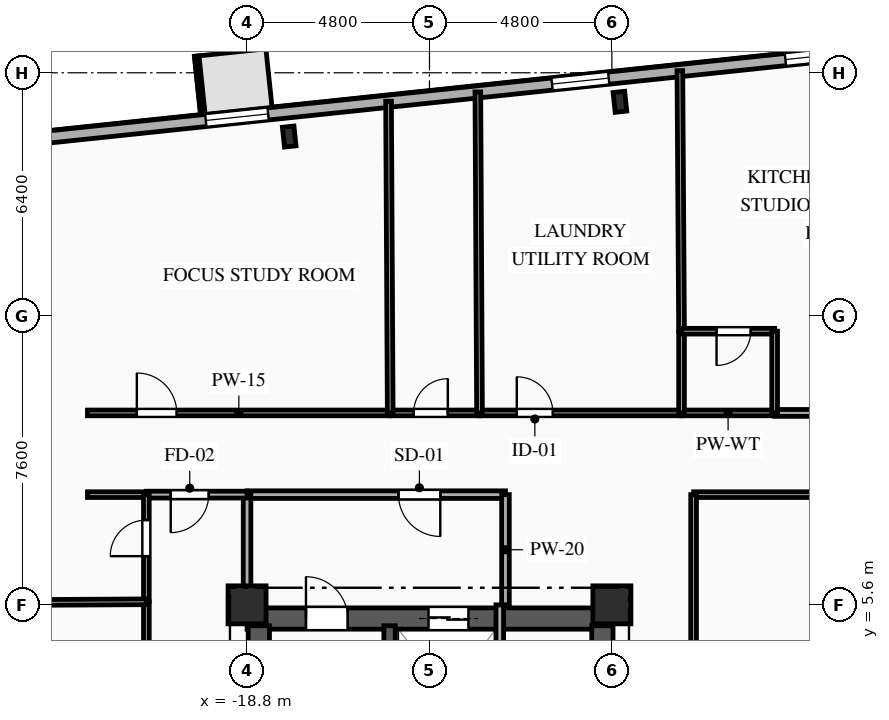
"""IFC4 building model, lengths in metres.
Left out: names, types, materials, properties, quantities, classifications, styles, units other than length and angle.
Written with IfcOpenShell. Run it as: python <this file> out.ifc"""

import sys

from ifc_helpers import new_model, si_unit, direction, frame, frame_2d, origin, origin_2d, place, context, subcontext, project, spatial, rectangle, i_section, extrude, element, fill, save


model = new_model("IFC4")
c1 = context("Model", 3, precision=1e-05, world=origin(), true_north=direction((0.0, 1.0)))
c2 = subcontext(c1, "Body", "Model", "MODEL_VIEW")
j1 = project(units=[si_unit("LENGTHUNIT", "METRE"), si_unit("PLANEANGLEUNIT", "RADIAN")], contexts=[c1])
p1 = place(None, origin())
s1 = spatial("IfcSite", under=j1, at=p1, CompositionType="ELEMENT")
p2 = place(p1, origin())
s2 = spatial("IfcBuilding", under=s1, at=p2, CompositionType="ELEMENT")
p3 = place(p2, frame((0.0, 0.0, 95.75)))
s3 = spatial("IfcBuildingStorey", under=s2, at=p3, CompositionType="ELEMENT", Elevation=95.75)
for number, where, z_axis, x_axis in (
    (1, (-18.8, 5.6, 0.0), (0.0, 0.0, 1.0), (1.0, 0.0, 0.0)),
    (2, (-9.2, 5.6, 0.0), (0.0, 0.0, 1.0), (1.0, 0.0, 0.0)),
):
    element("IfcColumn", number, at=place(p3, frame(where, z_axis=z_axis, x_axis=x_axis)), inside=s3, PredefinedType="COLUMN", context=c2, shape_type="SweptSolid", body=[
        extrude(rectangle(XDim=1.0, YDim=1.0, at=origin_2d()), origin(), (0.0, 0.0, 1.0), 3.35),
    ])
for number, where, z_axis, x_axis in (
    (3, (-8.989, 18.836, 0.0), (0.0, 0.0, 1.0), (0.995, 0.105, 0.0)),
    (4, (-17.691, 17.922, 0.0), (0.0, 0.0, 1.0), (0.995, 0.105, 0.0)),
):
    element("IfcColumn", number, at=place(p3, frame(where, z_axis=z_axis, x_axis=x_axis)), inside=s3, PredefinedType="COLUMN", context=c2, shape_type="SweptSolid", body=[
        extrude(i_section(OverallWidth=0.306, OverallDepth=0.524, WebThickness=0.021, FlangeThickness=0.04, FilletRadius=0.027, at=origin_2d()), origin(), (0.0, 0.0, 1.0), 3.35),
    ])
p4 = place(p3, frame((-27.107, 17.586, 0.0), z_axis=(0.0, 0.0, 1.0), x_axis=(0.994521628355, 0.104531003701, 0.0)))
e5 = element("IfcWall", 5, at=p4, inside=s3, PredefinedType="SOLIDWALL", context=c2, shape_type="SweptSolid", body=[
    extrude(rectangle(XDim=53.8, YDim=0.32, at=frame_2d((26.9, 0.0))), origin(), (0.0, 0.0, 1.0), 3.045),
])
p5 = place(p4, frame((7.261, 0.0, 0.85)))
e6 = element("IfcOpeningElement", 6, at=p5, cuts=e5, PredefinedType="OPENING", context=c2, shape_type="SweptSolid", body=[
    extrude(rectangle(XDim=1.65, YDim=1.85, at=frame_2d((0.825, 0.925))), frame((0.0, 0.17, 0.0), z_axis=(0.0, -1.0, 0.0), x_axis=(1.0, 0.0, 0.0)), (0.0, 0.0, 1.0), 0.34),
])
p6 = place(p4, frame((16.423, 0.0, 0.85)))
e7 = element("IfcOpeningElement", 7, at=p6, cuts=e5, PredefinedType="OPENING", context=c2, shape_type="SweptSolid", body=[
    extrude(rectangle(XDim=1.5, YDim=1.85, at=frame_2d((0.75, 0.925))), frame((0.0, 0.17, 0.0), z_axis=(0.0, -1.0, 0.0), x_axis=(1.0, 0.0, 0.0)), (0.0, 0.0, 1.0), 0.34),
])
p7 = place(p4, frame((22.598, 0.0, 0.85)))
e8 = element("IfcOpeningElement", 8, at=p7, cuts=e5, PredefinedType="OPENING", context=c2, shape_type="SweptSolid", body=[
    extrude(rectangle(XDim=2.2, YDim=1.85, at=frame_2d((1.1, 0.925))), frame((0.0, 0.17, 0.0), z_axis=(0.0, -1.0, 0.0), x_axis=(1.0, 0.0, 0.0)), (0.0, 0.0, 1.0), 0.34),
])
p8 = place(p4, frame((30.283, 0.0, 0.85)))
e9 = element("IfcOpeningElement", 9, at=p8, cuts=e5, PredefinedType="OPENING", context=c2, shape_type="SweptSolid", body=[
    extrude(rectangle(XDim=2.2, YDim=1.85, at=frame_2d((1.1, 0.925))), frame((0.0, 0.17, 0.0), z_axis=(0.0, -1.0, 0.0), x_axis=(1.0, 0.0, 0.0)), (0.0, 0.0, 1.0), 0.34),
])
p9 = place(p4, frame((38.009, 0.0, 0.85)))
e10 = element("IfcOpeningElement", 10, at=p9, cuts=e5, PredefinedType="OPENING", context=c2, shape_type="SweptSolid", body=[
    extrude(rectangle(XDim=2.2, YDim=1.85, at=frame_2d((1.1, 0.925))), frame((0.0, 0.17, 0.0), z_axis=(0.0, -1.0, 0.0), x_axis=(1.0, 0.0, 0.0)), (0.0, 0.0, 1.0), 0.34),
])
p10 = place(p4, frame((44.008, 0.0, 0.85)))
e11 = element("IfcOpeningElement", 11, at=p10, cuts=e5, PredefinedType="OPENING", context=c2, shape_type="SweptSolid", body=[
    extrude(rectangle(XDim=1.65, YDim=1.85, at=frame_2d((0.825, 0.925))), frame((0.0, 0.17, 0.0), z_axis=(0.0, -1.0, 0.0), x_axis=(1.0, 0.0, 0.0)), (0.0, 0.0, 1.0), 0.34),
])
p11 = place(p4, frame((47.691, 0.0, 0.85)))
e12 = element("IfcOpeningElement", 12, at=p11, cuts=e5, PredefinedType="OPENING", context=c2, shape_type="SweptSolid", body=[
    extrude(rectangle(XDim=1.65, YDim=1.85, at=frame_2d((0.825, 0.925))), frame((0.0, 0.17, 0.0), z_axis=(0.0, -1.0, 0.0), x_axis=(1.0, 0.0, 0.0)), (0.0, 0.0, 1.0), 0.34),
])
p12 = place(p4, frame((51.054, 0.0, 0.85)))
e13 = element("IfcOpeningElement", 13, at=p12, cuts=e5, PredefinedType="OPENING", context=c2, shape_type="SweptSolid", body=[
    extrude(rectangle(XDim=1.65, YDim=1.85, at=frame_2d((0.825, 0.925))), frame((0.0, 0.17, 0.0), z_axis=(0.0, -1.0, 0.0), x_axis=(1.0, 0.0, 0.0)), (0.0, 0.0, 1.0), 0.34),
])
p13 = place(p3, frame((-18.8, 5.24, 0.0), z_axis=(0.0, 0.0, 1.0), x_axis=(1.0, 0.0, 0.0)))
e14 = element("IfcWall", 14, at=p13, inside=s3, PredefinedType="SHEAR", context=c2, shape_type="SweptSolid", body=[
    extrude(rectangle(XDim=9.6, YDim=0.56, at=frame_2d((4.8, 0.0))), origin(), (0.0, 0.0, 1.0), 3.045),
])
p14 = place(p13, frame((1.55, 0.0, 0.0)))
e15 = element("IfcOpeningElement", 15, at=p14, cuts=e14, PredefinedType="OPENING", context=c2, shape_type="SweptSolid", body=[
    extrude(rectangle(XDim=1.1, YDim=2.15, at=frame_2d((0.55, 1.075))), frame((0.0, 0.29, 0.0), z_axis=(0.0, -1.0, 0.0), x_axis=(1.0, 0.0, 0.0)), (0.0, 0.0, 1.0), 0.58),
])
p15 = place(p13, frame((4.775, 0.0, 0.0)))
e16 = element("IfcOpeningElement", 16, at=p15, cuts=e14, PredefinedType="OPENING", context=c2, shape_type="SweptSolid", body=[
    extrude(rectangle(XDim=1.05, YDim=2.1, at=frame_2d((0.525, 1.05))), frame((0.0, 0.29, 0.0), z_axis=(0.0, -1.0, 0.0), x_axis=(1.0, 0.0, 0.0)), (0.0, 0.0, 1.0), 0.58),
])
p16 = place(p3, frame((-18.49, -5.05, 0.0), z_axis=(0.0, 0.0, 1.0), x_axis=(0.0, 1.0, 0.0)))
e17 = element("IfcWall", 17, at=p16, inside=s3, PredefinedType="SHEAR", context=c2, shape_type="SweptSolid", body=[
    extrude(rectangle(XDim=10.1, YDim=0.56, at=frame_2d((5.05, 0.0))), origin(), (0.0, 0.0, 1.0), 3.045),
])
p17 = place(p3, frame((-9.45, -5.05, 0.0), z_axis=(0.0, 0.0, 1.0), x_axis=(0.0, 1.0, 0.0)))
e18 = element("IfcWall", 18, at=p17, inside=s3, PredefinedType="SHEAR", context=c2, shape_type="SweptSolid", body=[
    extrude(rectangle(XDim=10.1, YDim=0.56, at=frame_2d((5.05, 0.0))), origin(), (0.0, 0.0, 1.0), 3.045),
])
p18 = place(p17, frame((7.15, 0.0, 0.0)))
e19 = element("IfcOpeningElement", 19, at=p18, cuts=e18, PredefinedType="OPENING", context=c2, shape_type="SweptSolid", body=[
    extrude(rectangle(XDim=0.9, YDim=2.1, at=frame_2d((0.45, 1.05))), frame((0.0, 0.29, 0.0), z_axis=(0.0, -1.0, 0.0), x_axis=(1.0, 0.0, 0.0)), (0.0, 0.0, 1.0), 0.58),
])
p19 = place(p17, frame((2.4, 0.0, 0.0)))
e20 = element("IfcOpeningElement", 20, at=p19, cuts=e18, PredefinedType="OPENING", context=c2, shape_type="SweptSolid", body=[
    extrude(rectangle(XDim=1.2, YDim=2.15, at=frame_2d((0.6, 1.075))), frame((0.0, 0.29, 0.0), z_axis=(0.0, -1.0, 0.0), x_axis=(1.0, 0.0, 0.0)), (0.0, 0.0, 1.0), 0.58),
])
p20 = place(p3, frame((-15.05, -5.05, 0.0), z_axis=(0.0, 0.0, 1.0), x_axis=(0.0, 1.0, 0.0)))
e21 = element("IfcWall", 21, at=p20, inside=s3, PredefinedType="SHEAR", context=c2, shape_type="SweptSolid", body=[
    extrude(rectangle(XDim=10.1, YDim=0.3, at=frame_2d((5.05, 0.0))), origin(), (0.0, 0.0, 1.0), 3.045),
])
p21 = place(p3, frame((-12.15, 1.55, 0.0), z_axis=(0.0, 0.0, 1.0), x_axis=(0.0, 1.0, 0.0)))
e22 = element("IfcWall", 22, at=p21, inside=s3, PredefinedType="PARTITIONING", context=c2, shape_type="SweptSolid", body=[
    extrude(rectangle(XDim=4.05, YDim=0.2, at=frame_2d((2.025, 0.0))), origin(), (0.0, 0.0, 1.0), 3.045),
])
p22 = place(p3, frame((-12.0, 8.5, 0.0), z_axis=(0.0, 0.0, 1.0), x_axis=(-1.0, 0.0, 0.0)))
e23 = element("IfcWall", 23, at=p22, inside=s3, PredefinedType="PARTITIONING", context=c2, shape_type="SweptSolid", body=[
    extrude(rectangle(XDim=6.8, YDim=0.2, at=frame_2d((3.4, 0.0))), origin(), (0.0, 0.0, 1.0), 3.045),
])
p23 = place(p22, frame((1.715, 0.0, 0.0)))
e24 = element("IfcOpeningElement", 24, at=p23, cuts=e23, PredefinedType="OPENING", context=c2, shape_type="SweptSolid", body=[
    extrude(rectangle(XDim=1.1, YDim=2.15, at=frame_2d((0.55, 1.075))), frame((0.0, 0.11, 0.0), z_axis=(0.0, -1.0, 0.0), x_axis=(1.0, 0.0, 0.0)), (0.0, 0.0, 1.0), 0.22),
])
p24 = place(p3, frame((-12.0, 5.6, 0.0), z_axis=(0.0, 0.0, 1.0), x_axis=(0.0, 1.0, 0.0)))
e25 = element("IfcWall", 25, at=p24, inside=s3, PredefinedType="PARTITIONING", context=c2, shape_type="SweptSolid", body=[
    extrude(rectangle(XDim=2.9, YDim=0.2, at=frame_2d((1.45, 0.0))), origin(), (0.0, 0.0, 1.0), 3.045),
])
p25 = place(p3, frame((-18.8, 8.5, 0.0), z_axis=(0.0, 0.0, 1.0), x_axis=(0.0, -1.0, 0.0)))
e26 = element("IfcWall", 26, at=p25, inside=s3, PredefinedType="PARTITIONING", context=c2, shape_type="SweptSolid", body=[
    extrude(rectangle(XDim=2.9, YDim=0.2, at=frame_2d((1.45, 0.0))), origin(), (0.0, 0.0, 1.0), 2.53),
])
p26 = place(p3, frame((-18.8, 8.5, 0.0), z_axis=(0.0, 0.0, 1.0), x_axis=(-1.0, 0.0, 0.0)))
e27 = element("IfcWall", 27, at=p26, inside=s3, PredefinedType="PARTITIONING", context=c2, shape_type="SweptSolid", body=[
    extrude(rectangle(XDim=2.65, YDim=0.18, at=frame_2d((1.325, 0.0))), origin(), (0.0, 0.0, 1.0), 3.045),
])
p27 = place(p26, frame((1.009, 0.0, 0.0)))
e28 = element("IfcOpeningElement", 28, at=p27, cuts=e27, PredefinedType="OPENING", context=c2, shape_type="SweptSolid", body=[
    extrude(rectangle(XDim=1.0, YDim=2.15, at=frame_2d((0.5, 1.075))), frame((0.0, 0.1, 0.0), z_axis=(0.0, -1.0, 0.0), x_axis=(1.0, 0.0, 0.0)), (0.0, 0.0, 1.0), 0.2),
])
p28 = place(p3, frame((-21.45, 8.5, 0.0), z_axis=(0.0, 0.0, 1.0), x_axis=(-1.0, 0.0, 0.0)))
e29 = element("IfcWall", 29, at=p28, inside=s3, PredefinedType="PARTITIONING", context=c2, shape_type="SweptSolid", body=[
    extrude(rectangle(XDim=1.55, YDim=0.15, at=frame_2d((0.775, 0.0))), origin(), (0.0, 0.0, 1.0), 3.045),
])
p29 = place(p3, frame((-23.0, 10.65, 0.0), z_axis=(0.0, 0.0, 1.0), x_axis=(1.0, 0.0, 0.0)))
e30 = element("IfcWall", 30, at=p29, inside=s3, PredefinedType="PARTITIONING", context=c2, shape_type="SweptSolid", body=[
    extrude(rectangle(XDim=7.967, YDim=0.15, at=frame_2d((3.983, 0.0))), origin(), (0.0, 0.0, 1.0), 3.045),
])
p30 = place(p29, frame((1.3, 0.0, 0.0)))
e31 = element("IfcOpeningElement", 31, at=p30, cuts=e30, PredefinedType="OPENING", context=c2, shape_type="SweptSolid", body=[
    extrude(rectangle(XDim=1.05, YDim=2.15, at=frame_2d((0.525, 1.075))), frame((0.0, 0.085, 0.0), z_axis=(0.0, -1.0, 0.0), x_axis=(1.0, 0.0, 0.0)), (0.0, 0.0, 1.0), 0.17),
])
p31 = place(p3, frame((-15.033, 10.65, 0.0), z_axis=(0.0, 0.0, 1.0), x_axis=(1.0, 0.0, 0.0)))
e32 = element("IfcWall", 32, at=p31, inside=s3, PredefinedType="PLUMBINGWALL", context=c2, shape_type="SweptSolid", body=[
    extrude(rectangle(XDim=2.35, YDim=0.15, at=frame_2d((1.175, 0.0))), origin(), (0.0, 0.0, 1.0), 3.045),
])
p32 = place(p31, frame((0.616, 0.0, 0.0)))
e33 = element("IfcOpeningElement", 33, at=p32, cuts=e32, PredefinedType="OPENING", context=c2, shape_type="SweptSolid", body=[
    extrude(rectangle(XDim=0.9, YDim=2.1, at=frame_2d((0.45, 1.05))), frame((0.0, 0.085, 0.0), z_axis=(0.0, -1.0, 0.0), x_axis=(1.0, 0.0, 0.0)), (0.0, 0.0, 1.0), 0.17),
])
p33 = place(p3, frame((-12.683, 10.65, 0.0), z_axis=(0.0, 0.0, 1.0), x_axis=(1.0, 0.0, 0.0)))
e34 = element("IfcWall", 34, at=p33, inside=s3, PredefinedType="PARTITIONING", context=c2, shape_type="SweptSolid", body=[
    extrude(rectangle(XDim=5.316, YDim=0.15, at=frame_2d((2.658, 0.0))), origin(), (0.0, 0.0, 1.0), 3.045),
])
p34 = place(p33, frame((0.981, 0.0, 0.0)))
e35 = element("IfcOpeningElement", 35, at=p34, cuts=e34, PredefinedType="OPENING", context=c2, shape_type="SweptSolid", body=[
    extrude(rectangle(XDim=0.95, YDim=2.1, at=frame_2d((0.475, 1.05))), frame((0.0, 0.085, 0.0), z_axis=(0.0, -1.0, 0.0), x_axis=(1.0, 0.0, 0.0)), (0.0, 0.0, 1.0), 0.17),
])
p35 = place(p3, frame((-4.917, 10.65, 0.0), z_axis=(0.0, 0.0, 1.0), x_axis=(1.0, 0.0, 0.0)))
e36 = element("IfcWall", 36, at=p35, inside=s3, PredefinedType="PARTITIONING", context=c2, shape_type="SweptSolid", body=[
    extrude(rectangle(XDim=4.917, YDim=0.18, at=frame_2d((2.458, 0.0))), origin(), (0.0, 0.0, 1.0), 3.045),
])
p36 = place(p35, frame((2.992, 0.0, 0.0)))
e37 = element("IfcOpeningElement", 37, at=p36, cuts=e36, PredefinedType="OPENING", context=c2, shape_type="SweptSolid", body=[
    extrude(rectangle(XDim=1.0, YDim=2.15, at=frame_2d((0.5, 1.075))), frame((0.0, 0.1, 0.0), z_axis=(0.0, -1.0, 0.0), x_axis=(1.0, 0.0, 0.0)), (0.0, 0.0, 1.0), 0.2),
])
p37 = place(p3, frame((-7.367, 10.65, 0.0), z_axis=(0.0, 0.0, 1.0), x_axis=(1.0, 0.0, 0.0)))
e38 = element("IfcWall", 38, at=p37, inside=s3, PredefinedType="PLUMBINGWALL", context=c2, shape_type="SweptSolid", body=[
    extrude(rectangle(XDim=2.45, YDim=0.15, at=frame_2d((1.225, 0.0))), origin(), (0.0, 0.0, 1.0), 3.045),
])
p38 = place(p3, frame((0.0, 8.5, 0.0), z_axis=(0.0, 0.0, 1.0), x_axis=(-1.0, 0.0, 0.0)))
e39 = element("IfcWall", 39, at=p38, inside=s3, PredefinedType="PARTITIONING", context=c2, shape_type="SweptSolid", body=[
    extrude(rectangle(XDim=7.05, YDim=0.15, at=frame_2d((3.525, 0.0))), origin(), (0.0, 0.0, 1.0), 3.045),
])
p39 = place(p38, frame((1.185, 0.0, 0.0)))
e40 = element("IfcOpeningElement", 40, at=p39, cuts=e39, PredefinedType="OPENING", context=c2, shape_type="SweptSolid", body=[
    extrude(rectangle(XDim=1.05, YDim=2.15, at=frame_2d((0.525, 1.075))), frame((0.0, 0.085, 0.0), z_axis=(0.0, -1.0, 0.0), x_axis=(1.0, 0.0, 0.0)), (0.0, 0.0, 1.0), 0.17),
])
p40 = place(p3, frame((-7.05, 8.5, 0.0), z_axis=(0.0, 0.0, 1.0), x_axis=(0.0, -1.0, 0.0)))
e41 = element("IfcWall", 41, at=p40, inside=s3, PredefinedType="PARTITIONING", context=c2, shape_type="SweptSolid", body=[
    extrude(rectangle(XDim=7.05, YDim=0.15, at=frame_2d((3.525, 0.0))), origin(), (0.0, 0.0, 1.0), 3.045),
])
p41 = place(p3, frame((-21.45, 2.86, 0.0), z_axis=(0.0, 0.0, 1.0), x_axis=(0.0, 1.0, 0.0)))
e42 = element("IfcWall", 42, at=p41, inside=s3, PredefinedType="PARTITIONING", context=c2, shape_type="SweptSolid", body=[
    extrude(rectangle(XDim=2.82, YDim=0.15, at=frame_2d((1.41, 0.0))), origin(), (0.0, 0.0, 1.0), 3.045),
])
p42 = place(p41, frame((0.669, 0.0, 0.0)))
e43 = element("IfcOpeningElement", 43, at=p42, cuts=e42, PredefinedType="OPENING", context=c2, shape_type="SweptSolid", body=[
    extrude(rectangle(XDim=0.95, YDim=2.1, at=frame_2d((0.475, 1.05))), frame((0.0, 0.085, 0.0), z_axis=(0.0, -1.0, 0.0), x_axis=(1.0, 0.0, 0.0)), (0.0, 0.0, 1.0), 0.17),
])
p43 = place(p3, frame((-21.45, 5.68, 0.0), z_axis=(0.0, 0.0, 1.0), x_axis=(0.0, 1.0, 0.0)))
e44 = element("IfcWall", 44, at=p43, inside=s3, PredefinedType="PARTITIONING", context=c2, shape_type="SweptSolid", body=[
    extrude(rectangle(XDim=2.82, YDim=0.15, at=frame_2d((1.41, 0.0))), origin(), (0.0, 0.0, 1.0), 3.045),
])
p44 = place(p43, frame((1.201, 0.0, 0.0)))
e45 = element("IfcOpeningElement", 45, at=p44, cuts=e44, PredefinedType="OPENING", context=c2, shape_type="SweptSolid", body=[
    extrude(rectangle(XDim=0.95, YDim=2.1, at=frame_2d((0.475, 1.05))), frame((0.0, 0.085, 0.0), z_axis=(0.0, -1.0, 0.0), x_axis=(1.0, 0.0, 0.0)), (0.0, 0.0, 1.0), 0.17),
])
p45 = place(p3, frame((-29.27, 5.636, 0.0), z_axis=(0.0, 0.0, 1.0), x_axis=(0.999984210669, 0.005619467326, 0.0)))
e46 = element("IfcWall", 46, at=p45, inside=s3, PredefinedType="PARTITIONING", context=c2, shape_type="SweptSolid", body=[
    extrude(rectangle(XDim=7.82, YDim=0.15, at=frame_2d((3.91, 0.0))), origin(), (0.0, 0.0, 1.0), 3.045),
])
p46 = place(p3, frame((-15.077, 18.85, 0.0), z_axis=(0.0, 0.0, 1.0), x_axis=(0.005358979853, -0.999985640564, 0.0)))
e47 = element("IfcWall", 47, at=p46, inside=s3, PredefinedType="PLUMBINGWALL", context=c2, shape_type="SweptSolid", body=[
    extrude(rectangle(XDim=8.2, YDim=0.15, at=frame_2d((4.1, 0.0))), origin(), (0.0, 0.0, 1.0), 3.045),
])
p47 = place(p3, frame((-12.727, 19.097, 0.0), z_axis=(0.0, 0.0, 1.0), x_axis=(0.005173341175, -0.999986618181, 0.0)))
e48 = element("IfcWall", 48, at=p47, inside=s3, PredefinedType="PLUMBINGWALL", context=c2, shape_type="SweptSolid", body=[
    extrude(rectangle(XDim=8.447, YDim=0.15, at=frame_2d((4.224, 0.0))), origin(), (0.0, 0.0, 1.0), 3.045),
])
p48 = place(p3, frame((-7.411, 19.656, 0.0), z_axis=(0.0, 0.0, 1.0), x_axis=(0.006409668201, -0.999979457866, 0.0)))
e49 = element("IfcWall", 49, at=p48, inside=s3, PredefinedType="PARTITIONING", context=c2, shape_type="SweptSolid", body=[
    extrude(rectangle(XDim=6.856, YDim=0.15, at=frame_2d((3.428, 0.0))), origin(), (0.0, 0.0, 1.0), 3.045),
])
p49 = place(p3, frame((-7.367, 12.8, 0.0), z_axis=(0.0, 0.0, 1.0), x_axis=(0.0, -1.0, 0.0)))
e50 = element("IfcWall", 50, at=p49, inside=s3, PredefinedType="PLUMBINGWALL", context=c2, shape_type="SweptSolid", body=[
    extrude(rectangle(XDim=2.15, YDim=0.15, at=frame_2d((1.075, 0.0))), origin(), (0.0, 0.0, 1.0), 3.045),
])
p50 = place(p3, frame((-4.917, 12.8, 0.0), z_axis=(0.0, 0.0, 1.0), x_axis=(-1.0, 0.0, 0.0)))
e51 = element("IfcWall", 51, at=p50, inside=s3, PredefinedType="PLUMBINGWALL", context=c2, shape_type="SweptSolid", body=[
    extrude(rectangle(XDim=2.45, YDim=0.15, at=frame_2d((1.225, 0.0))), origin(), (0.0, 0.0, 1.0), 3.045),
])
p51 = place(p50, frame((0.629, 0.0, 0.0)))
e52 = element("IfcOpeningElement", 52, at=p51, cuts=e51, PredefinedType="OPENING", context=c2, shape_type="SweptSolid", body=[
    extrude(rectangle(XDim=0.9, YDim=2.1, at=frame_2d((0.45, 1.05))), frame((0.0, 0.085, 0.0), z_axis=(0.0, -1.0, 0.0), x_axis=(1.0, 0.0, 0.0)), (0.0, 0.0, 1.0), 0.17),
])
p52 = place(p3, frame((-4.917, 10.65, 0.0), z_axis=(0.0, 0.0, 1.0), x_axis=(0.0, 1.0, 0.0)))
e53 = element("IfcWall", 53, at=p52, inside=s3, PredefinedType="PLUMBINGWALL", context=c2, shape_type="SweptSolid", body=[
    extrude(rectangle(XDim=2.15, YDim=0.15, at=frame_2d((1.075, 0.0))), origin(), (0.0, 0.0, 1.0), 3.045),
])
p53 = place(p5, origin())
e54 = element("IfcWindow", 54, at=p53, inside=s3, PartitioningType="SINGLE_PANEL", PredefinedType="WINDOW", context=c2, shape_type="SweptSolid", body=[
    extrude(rectangle(XDim=1.65, YDim=1.85, at=frame_2d((0.825, 0.925))), frame((0.0, 0.03, 0.0), z_axis=(0.0, -1.0, 0.0), x_axis=(1.0, 0.0, 0.0)), (0.0, 0.0, 1.0), 0.06),
])
fill(e6, e54)
p54 = place(p6, origin())
e55 = element("IfcWindow", 55, at=p54, inside=s3, PartitioningType="SINGLE_PANEL", PredefinedType="WINDOW", context=c2, shape_type="SweptSolid", body=[
    extrude(rectangle(XDim=1.5, YDim=1.85, at=frame_2d((0.75, 0.925))), frame((0.0, 0.03, 0.0), z_axis=(0.0, -1.0, 0.0), x_axis=(1.0, 0.0, 0.0)), (0.0, 0.0, 1.0), 0.06),
])
fill(e7, e55)
p55 = place(p7, origin())
e56 = element("IfcWindow", 56, at=p55, inside=s3, PartitioningType="SINGLE_PANEL", PredefinedType="WINDOW", context=c2, shape_type="SweptSolid", body=[
    extrude(rectangle(XDim=2.2, YDim=1.85, at=frame_2d((1.1, 0.925))), frame((0.0, 0.03, 0.0), z_axis=(0.0, -1.0, 0.0), x_axis=(1.0, 0.0, 0.0)), (0.0, 0.0, 1.0), 0.06),
])
fill(e8, e56)
p56 = place(p14, origin())
e57 = element("IfcDoor", 57, at=p56, inside=s3, OperationType="SINGLE_SWING_LEFT", PredefinedType="DOOR", context=c2, shape_type="SweptSolid", body=[
    extrude(rectangle(XDim=1.1, YDim=2.15, at=frame_2d((0.55, 1.075))), frame((0.0, 0.025, 0.0), z_axis=(0.0, -1.0, 0.0), x_axis=(1.0, 0.0, 0.0)), (0.0, 0.0, 1.0), 0.05),
])
fill(e15, e57)
p57 = place(p15, origin())
e58 = element("IfcDoor", 58, at=p57, inside=s3, OperationType="DOUBLE_DOOR_SLIDING", PredefinedType="DOOR", context=c2, shape_type="SweptSolid", body=[
    extrude(rectangle(XDim=1.05, YDim=2.1, at=frame_2d((0.525, 1.05))), frame((0.0, 0.025, 0.0), z_axis=(0.0, -1.0, 0.0), x_axis=(1.0, 0.0, 0.0)), (0.0, 0.0, 1.0), 0.05),
])
fill(e16, e58)
p58 = place(p23, origin())
e59 = element("IfcDoor", 59, at=p58, inside=s3, OperationType="SINGLE_SWING_LEFT", PredefinedType="DOOR", context=c2, shape_type="SweptSolid", body=[
    extrude(rectangle(XDim=1.1, YDim=2.15, at=frame_2d((0.55, 1.075))), frame((0.0, 0.025, 0.0), z_axis=(0.0, -1.0, 0.0), x_axis=(1.0, 0.0, 0.0)), (0.0, 0.0, 1.0), 0.05),
])
fill(e24, e59)
p59 = place(p27, origin())
e60 = element("IfcDoor", 60, at=p59, inside=s3, OperationType="SINGLE_SWING_RIGHT", PredefinedType="DOOR", context=c2, shape_type="SweptSolid", body=[
    extrude(rectangle(XDim=1.0, YDim=2.15, at=frame_2d((0.5, 1.075))), frame((0.0, 0.025, 0.0), z_axis=(0.0, -1.0, 0.0), x_axis=(1.0, 0.0, 0.0)), (0.0, 0.0, 1.0), 0.05),
])
fill(e28, e60)
p60 = place(p30, origin())
e61 = element("IfcDoor", 61, at=p60, inside=s3, OperationType="SINGLE_SWING_LEFT", PredefinedType="DOOR", context=c2, shape_type="SweptSolid", body=[
    extrude(rectangle(XDim=1.05, YDim=2.15, at=frame_2d((0.525, 1.075))), frame((0.0, 0.025, 0.0), z_axis=(0.0, -1.0, 0.0), x_axis=(1.0, 0.0, 0.0)), (0.0, 0.0, 1.0), 0.05),
])
fill(e31, e61)
p61 = place(p32, origin())
e62 = element("IfcDoor", 62, at=p61, inside=s3, OperationType="SINGLE_SWING_RIGHT", PredefinedType="DOOR", context=c2, shape_type="SweptSolid", body=[
    extrude(rectangle(XDim=0.9, YDim=2.1, at=frame_2d((0.45, 1.05))), frame((0.0, 0.025, 0.0), z_axis=(0.0, -1.0, 0.0), x_axis=(1.0, 0.0, 0.0)), (0.0, 0.0, 1.0), 0.05),
])
fill(e33, e62)
p62 = place(p34, origin())
e63 = element("IfcDoor", 63, at=p62, inside=s3, OperationType="SINGLE_SWING_LEFT", PredefinedType="DOOR", context=c2, shape_type="SweptSolid", body=[
    extrude(rectangle(XDim=0.95, YDim=2.1, at=frame_2d((0.475, 1.05))), frame((0.0, 0.025, 0.0), z_axis=(0.0, -1.0, 0.0), x_axis=(1.0, 0.0, 0.0)), (0.0, 0.0, 1.0), 0.05),
])
fill(e35, e63)
p63 = place(p44, origin())
e64 = element("IfcDoor", 64, at=p63, inside=s3, OperationType="SINGLE_SWING_LEFT", PredefinedType="DOOR", context=c2, shape_type="SweptSolid", body=[
    extrude(rectangle(XDim=0.95, YDim=2.1, at=frame_2d((0.475, 1.05))), frame((0.0, 0.025, 0.0), z_axis=(0.0, -1.0, 0.0), x_axis=(1.0, 0.0, 0.0)), (0.0, 0.0, 1.0), 0.05),
])
fill(e45, e64)
p64 = place(p51, origin())
e65 = element("IfcDoor", 65, at=p64, inside=s3, OperationType="SINGLE_SWING_RIGHT", PredefinedType="DOOR", context=c2, shape_type="SweptSolid", body=[
    extrude(rectangle(XDim=0.9, YDim=2.1, at=frame_2d((0.45, 1.05))), frame((0.0, 0.025, 0.0), z_axis=(0.0, -1.0, 0.0), x_axis=(1.0, 0.0, 0.0)), (0.0, 0.0, 1.0), 0.05),
])
fill(e52, e65)
save(model, sys.argv[1])
